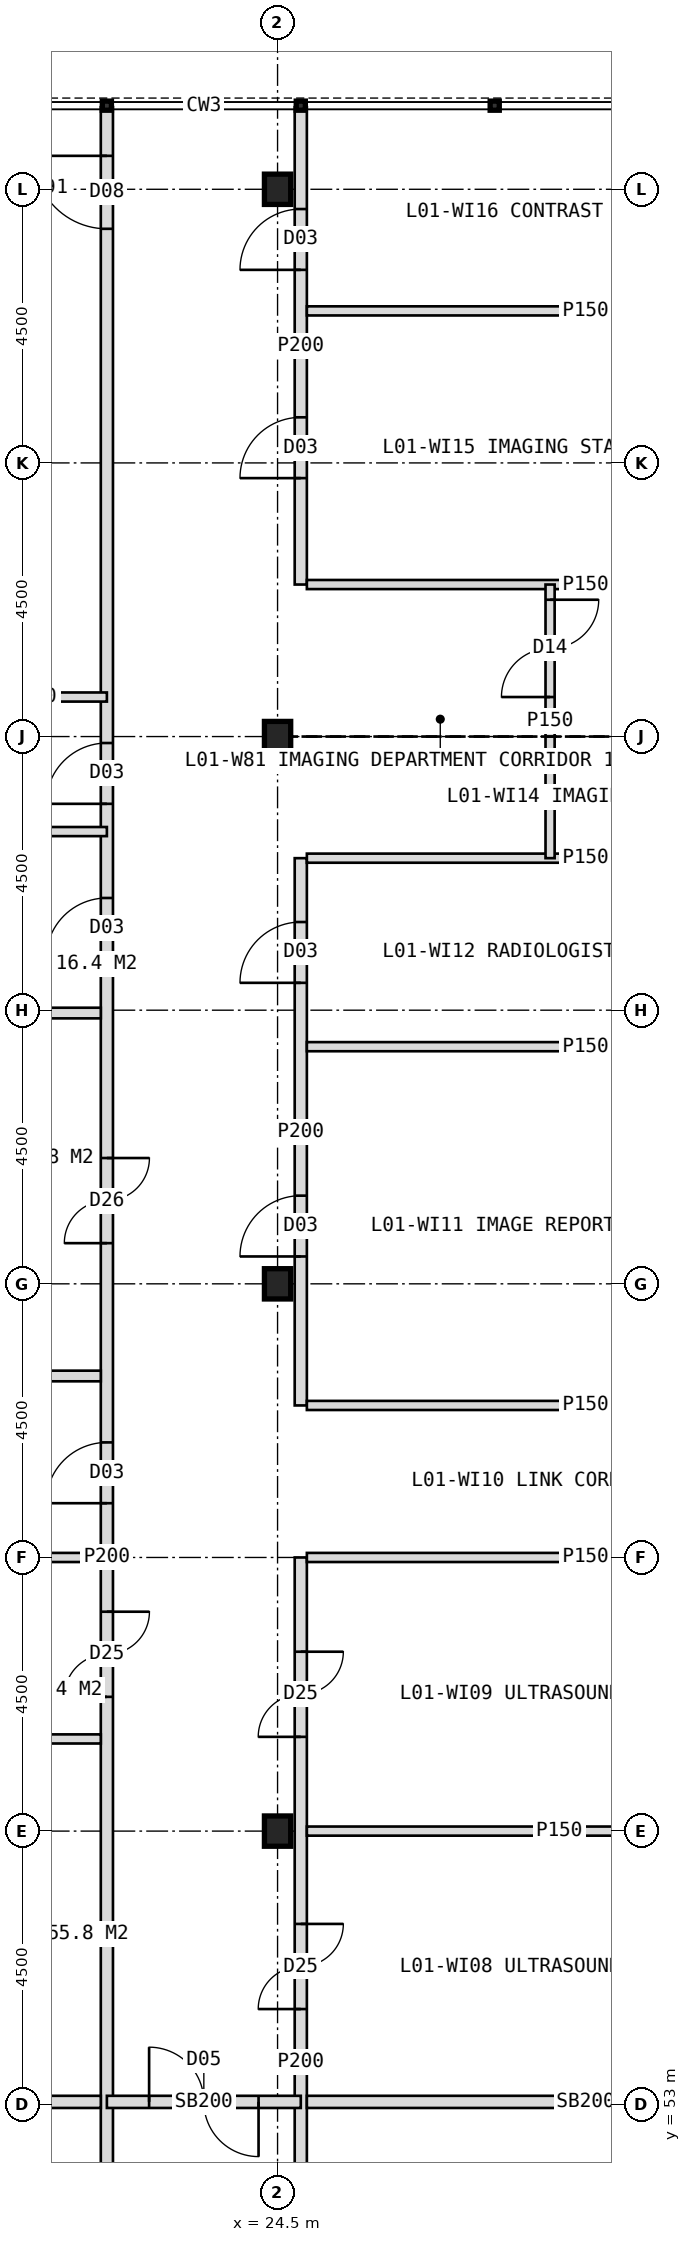
"""IFC4 building model, lengths in metres.
Left out: names, types, materials, properties, quantities, classifications, styles, units other than length and angle.
Written with IfcOpenShell. Run it as: python <this file> out.ifc"""

import sys

from ifc_helpers import new_model, si_unit, direction, frame, frame_2d, origin, origin_2d, place, context, subcontext, project, spatial, rectangle, i_section, extrude, element, fill, save


model = new_model("IFC4")
c1 = context("Model", 3, precision=1e-05, world=origin(), true_north=direction((0.0, 1.0)))
c2 = subcontext(c1, "Body", "Model", "MODEL_VIEW")
j1 = project(units=[si_unit("LENGTHUNIT", "METRE"), si_unit("PLANEANGLEUNIT", "RADIAN")], contexts=[c1])
p1 = place(None, origin())
s1 = spatial("IfcSite", under=j1, at=p1, CompositionType="ELEMENT")
p2 = place(p1, origin())
s2 = spatial("IfcBuilding", under=s1, at=p2, CompositionType="ELEMENT")
p3 = place(p2, frame((0.0, 0.0, 6.0)))
s3 = spatial("IfcBuildingStorey", under=s2, at=p3, CompositionType="ELEMENT", Elevation=6.0)
for number, where, z_axis, x_axis in (
    (1, (24.5, 57.5, 0.0), (0.0, 0.0, 1.0), (1.0, 0.0, 0.0)),
    (2, (24.5, 66.5, 0.0), (0.0, 0.0, 1.0), (1.0, 0.0, 0.0)),
    (3, (24.5, 75.5, 0.0), (0.0, 0.0, 1.0), (1.0, 0.0, 0.0)),
    (4, (24.5, 84.5, 0.0), (0.0, 0.0, 1.0), (1.0, 0.0, 0.0)),
):
    element("IfcColumn", number, at=place(p3, frame(where, z_axis=z_axis, x_axis=x_axis)), inside=s3, PredefinedType="COLUMN", context=c2, shape_type="SweptSolid", body=[
        extrude(i_section(OverallWidth=0.432, OverallDepth=0.498, WebThickness=0.056, FlangeThickness=0.089, FilletRadius=0.015, at=origin_2d()), origin(), (0.0, 0.0, 1.0), 5.0),
    ])
p4 = place(p3, frame((21.693, 38.15, 0.0), z_axis=(0.0, 0.0, 1.0), x_axis=(0.0, 1.0, 0.0)))
e5 = element("IfcWall", 5, at=p4, inside=s3, PredefinedType="PARTITIONING", context=c2, shape_type="SweptSolid", body=[
    extrude(rectangle(XDim=47.7, YDim=0.2, at=frame_2d((23.85, 0.0))), origin(), (0.0, 0.0, 1.0), 4.7),
])
p5 = place(p4, frame((45.7, 0.0, 0.0)))
e6 = element("IfcOpeningElement", 6, at=p5, cuts=e5, PredefinedType="OPENING", context=c2, shape_type="SweptSolid", body=[
    extrude(rectangle(XDim=1.2, YDim=2.1, at=frame_2d((0.6, 1.05))), frame((0.0, 0.11, 0.0), z_axis=(0.0, -1.0, 0.0), x_axis=(1.0, 0.0, 0.0)), (0.0, 0.0, 1.0), 0.22),
])
p6 = place(p4, frame((36.244, 0.0, 0.0)))
e7 = element("IfcOpeningElement", 7, at=p6, cuts=e5, PredefinedType="OPENING", context=c2, shape_type="SweptSolid", body=[
    extrude(rectangle(XDim=1.0, YDim=2.1, at=frame_2d((0.5, 1.05))), frame((0.0, 0.11, 0.0), z_axis=(0.0, -1.0, 0.0), x_axis=(1.0, 0.0, 0.0)), (0.0, 0.0, 1.0), 0.22),
])
p7 = place(p4, frame((2.222, 0.0, 0.0)))
e8 = element("IfcOpeningElement", 8, at=p7, cuts=e5, PredefinedType="OPENING", context=c2, shape_type="SweptSolid", body=[
    extrude(rectangle(XDim=1.4, YDim=2.2, at=frame_2d((0.7, 1.1))), frame((0.0, 0.11, 0.0), z_axis=(0.0, -1.0, 0.0), x_axis=(1.0, 0.0, 0.0)), (0.0, 0.0, 1.0), 0.22),
])
p8 = place(p4, frame((6.836, 0.0, 0.0)))
e9 = element("IfcOpeningElement", 9, at=p8, cuts=e5, PredefinedType="OPENING", context=c2, shape_type="SweptSolid", body=[
    extrude(rectangle(XDim=1.0, YDim=2.1, at=frame_2d((0.5, 1.05))), frame((0.0, 0.11, 0.0), z_axis=(0.0, -1.0, 0.0), x_axis=(1.0, 0.0, 0.0)), (0.0, 0.0, 1.0), 0.22),
])
p9 = place(p4, frame((11.113, 0.0, 0.0)))
e10 = element("IfcOpeningElement", 10, at=p9, cuts=e5, PredefinedType="OPENING", context=c2, shape_type="SweptSolid", body=[
    extrude(rectangle(XDim=1.4, YDim=2.2, at=frame_2d((0.7, 1.1))), frame((0.0, 0.11, 0.0), z_axis=(0.0, -1.0, 0.0), x_axis=(1.0, 0.0, 0.0)), (0.0, 0.0, 1.0), 0.22),
])
p10 = place(p4, frame((21.558, 0.0, 0.0)))
e11 = element("IfcOpeningElement", 11, at=p10, cuts=e5, PredefinedType="OPENING", context=c2, shape_type="SweptSolid", body=[
    extrude(rectangle(XDim=1.4, YDim=2.2, at=frame_2d((0.7, 1.1))), frame((0.0, 0.11, 0.0), z_axis=(0.0, -1.0, 0.0), x_axis=(1.0, 0.0, 0.0)), (0.0, 0.0, 1.0), 0.22),
])
p11 = place(p4, frame((24.742, 0.0, 0.0)))
e12 = element("IfcOpeningElement", 12, at=p11, cuts=e5, PredefinedType="OPENING", context=c2, shape_type="SweptSolid", body=[
    extrude(rectangle(XDim=1.0, YDim=2.1, at=frame_2d((0.5, 1.05))), frame((0.0, 0.11, 0.0), z_axis=(0.0, -1.0, 0.0), x_axis=(1.0, 0.0, 0.0)), (0.0, 0.0, 1.0), 0.22),
])
p12 = place(p4, frame((29.019, 0.0, 0.0)))
e13 = element("IfcOpeningElement", 13, at=p12, cuts=e5, PredefinedType="OPENING", context=c2, shape_type="SweptSolid", body=[
    extrude(rectangle(XDim=1.4, YDim=2.2, at=frame_2d((0.7, 1.1))), frame((0.0, 0.11, 0.0), z_axis=(0.0, -1.0, 0.0), x_axis=(1.0, 0.0, 0.0)), (0.0, 0.0, 1.0), 0.22),
])
p13 = place(p4, frame((33.695, 0.0, 0.0)))
e14 = element("IfcOpeningElement", 14, at=p13, cuts=e5, PredefinedType="OPENING", context=c2, shape_type="SweptSolid", body=[
    extrude(rectangle(XDim=1.0, YDim=2.1, at=frame_2d((0.5, 1.05))), frame((0.0, 0.11, 0.0), z_axis=(0.0, -1.0, 0.0), x_axis=(1.0, 0.0, 0.0)), (0.0, 0.0, 1.0), 0.22),
])
p14 = place(p3, frame((24.882, 45.4, 0.0), z_axis=(0.0, 0.0, 1.0), x_axis=(0.0, 1.0, 0.0)))
e15 = element("IfcWall", 15, at=p14, inside=s3, PredefinedType="PARTITIONING", context=c2, shape_type="SweptSolid", body=[
    extrude(rectangle(XDim=16.6, YDim=0.2, at=frame_2d((8.3, 0.0))), origin(), (0.0, 0.0, 1.0), 4.7),
])
p15 = place(p14, frame((1.65, 0.0, 0.0)))
e16 = element("IfcOpeningElement", 16, at=p15, cuts=e15, PredefinedType="OPENING", context=c2, shape_type="SweptSolid", body=[
    extrude(rectangle(XDim=1.0, YDim=2.1, at=frame_2d((0.5, 1.05))), frame((0.0, 0.11, 0.0), z_axis=(0.0, -1.0, 0.0), x_axis=(1.0, 0.0, 0.0)), (0.0, 0.0, 1.0), 0.22),
])
p16 = place(p14, frame((5.473, 0.0, 0.0)))
e17 = element("IfcOpeningElement", 17, at=p16, cuts=e15, PredefinedType="OPENING", context=c2, shape_type="SweptSolid", body=[
    extrude(rectangle(XDim=1.0, YDim=2.1, at=frame_2d((0.5, 1.05))), frame((0.0, 0.11, 0.0), z_axis=(0.0, -1.0, 0.0), x_axis=(1.0, 0.0, 0.0)), (0.0, 0.0, 1.0), 0.22),
])
p17 = place(p14, frame((9.174, 0.0, 0.0)))
e18 = element("IfcOpeningElement", 18, at=p17, cuts=e15, PredefinedType="OPENING", context=c2, shape_type="SweptSolid", body=[
    extrude(rectangle(XDim=1.4, YDim=2.2, at=frame_2d((0.7, 1.1))), frame((0.0, 0.11, 0.0), z_axis=(0.0, -1.0, 0.0), x_axis=(1.0, 0.0, 0.0)), (0.0, 0.0, 1.0), 0.22),
])
p18 = place(p14, frame((13.65, 0.0, 0.0)))
e19 = element("IfcOpeningElement", 19, at=p18, cuts=e15, PredefinedType="OPENING", context=c2, shape_type="SweptSolid", body=[
    extrude(rectangle(XDim=1.4, YDim=2.2, at=frame_2d((0.7, 1.1))), frame((0.0, 0.11, 0.0), z_axis=(0.0, -1.0, 0.0), x_axis=(1.0, 0.0, 0.0)), (0.0, 0.0, 1.0), 0.22),
])
p19 = place(p3, frame((24.882, 64.5, 0.0), z_axis=(0.0, 0.0, 1.0), x_axis=(0.0, 1.0, 0.0)))
e20 = element("IfcWall", 20, at=p19, inside=s3, PredefinedType="PARTITIONING", context=c2, shape_type="SweptSolid", body=[
    extrude(rectangle(XDim=9.0, YDim=0.2, at=frame_2d((4.5, 0.0))), origin(), (0.0, 0.0, 1.0), 4.7),
])
p20 = place(p19, frame((2.45, 0.0, 0.0)))
e21 = element("IfcOpeningElement", 21, at=p20, cuts=e20, PredefinedType="OPENING", context=c2, shape_type="SweptSolid", body=[
    extrude(rectangle(XDim=1.0, YDim=2.1, at=frame_2d((0.5, 1.05))), frame((0.0, 0.11, 0.0), z_axis=(0.0, -1.0, 0.0), x_axis=(1.0, 0.0, 0.0)), (0.0, 0.0, 1.0), 0.22),
])
p21 = place(p19, frame((6.95, 0.0, 0.0)))
e22 = element("IfcOpeningElement", 22, at=p21, cuts=e20, PredefinedType="OPENING", context=c2, shape_type="SweptSolid", body=[
    extrude(rectangle(XDim=1.0, YDim=2.1, at=frame_2d((0.5, 1.05))), frame((0.0, 0.11, 0.0), z_axis=(0.0, -1.0, 0.0), x_axis=(1.0, 0.0, 0.0)), (0.0, 0.0, 1.0), 0.22),
])
p22 = place(p3, frame((24.882, 78.0, 0.0), z_axis=(0.0, 0.0, 1.0), x_axis=(0.0, 1.0, 0.0)))
e23 = element("IfcWall", 23, at=p22, inside=s3, PredefinedType="PARTITIONING", context=c2, shape_type="SweptSolid", body=[
    extrude(rectangle(XDim=7.85, YDim=0.2, at=frame_2d((3.925, 0.0))), origin(), (0.0, 0.0, 1.0), 4.7),
])
p23 = place(p22, frame((1.75, 0.0, 0.0)))
e24 = element("IfcOpeningElement", 24, at=p23, cuts=e23, PredefinedType="OPENING", context=c2, shape_type="SweptSolid", body=[
    extrude(rectangle(XDim=1.0, YDim=2.1, at=frame_2d((0.5, 1.05))), frame((0.0, 0.11, 0.0), z_axis=(0.0, -1.0, 0.0), x_axis=(1.0, 0.0, 0.0)), (0.0, 0.0, 1.0), 0.22),
])
p24 = place(p22, frame((5.175, 0.0, 0.0)))
e25 = element("IfcOpeningElement", 25, at=p24, cuts=e23, PredefinedType="OPENING", context=c2, shape_type="SweptSolid", body=[
    extrude(rectangle(XDim=1.0, YDim=2.1, at=frame_2d((0.5, 1.05))), frame((0.0, 0.11, 0.0), z_axis=(0.0, -1.0, 0.0), x_axis=(1.0, 0.0, 0.0)), (0.0, 0.0, 1.0), 0.22),
])
p25 = place(p3, frame((21.693, 53.047, 0.0), z_axis=(0.0, 0.0, 1.0), x_axis=(1.0, 0.0, 0.0)))
e26 = element("IfcWall", 26, at=p25, inside=s3, PredefinedType="SOLIDWALL", context=c2, shape_type="SweptSolid", body=[
    extrude(rectangle(XDim=3.189, YDim=0.2, at=frame_2d((1.594, 0.0))), origin(), (0.0, 0.0, 1.0), 4.7),
])
p26 = place(p25, frame((0.695, 0.0, 0.0)))
e27 = element("IfcOpeningElement", 27, at=p26, cuts=e26, PredefinedType="OPENING", context=c2, shape_type="SweptSolid", body=[
    extrude(rectangle(XDim=1.8, YDim=2.2, at=frame_2d((0.9, 1.1))), frame((0.0, 0.11, 0.0), z_axis=(0.0, -1.0, 0.0), x_axis=(1.0, 0.0, 0.0)), (0.0, 0.0, 1.0), 0.22),
])
p27 = place(p3, frame((19.3, 76.15, 0.0), z_axis=(0.0, 0.0, 1.0), x_axis=(1.0, 0.0, 0.0)))
e28 = element("IfcWall", 28, at=p27, inside=s3, PredefinedType="PARTITIONING", context=c2, shape_type="SweptSolid", body=[
    extrude(rectangle(XDim=2.393, YDim=0.15, at=frame_2d((1.197, 0.0))), origin(), (0.0, 0.0, 1.0), 4.7),
])
p28 = place(p3, frame((12.15, 73.938, 0.0), z_axis=(0.0, 0.0, 1.0), x_axis=(1.0, 0.0, 0.0)))
e29 = element("IfcWall", 29, at=p28, inside=s3, PredefinedType="PARTITIONING", context=c2, shape_type="SweptSolid", body=[
    extrude(rectangle(XDim=9.543, YDim=0.15, at=frame_2d((4.771, 0.0))), origin(), (0.0, 0.0, 1.0), 4.7),
])
p29 = place(p3, frame((12.15, 53.047, 0.0), z_axis=(0.0, 0.0, 1.0), x_axis=(1.0, 0.0, 0.0)))
e30 = element("IfcWall", 30, at=p29, inside=s3, PredefinedType="SOLIDWALL", context=c2, shape_type="SweptSolid", body=[
    extrude(rectangle(XDim=9.443, YDim=0.2, at=frame_2d((4.722, 0.0))), origin(), (0.0, 0.0, 1.0), 4.7),
])
p30 = place(p3, frame((12.15, 59.016, 0.0), z_axis=(0.0, 0.0, 1.0), x_axis=(1.0, 0.0, 0.0)))
e31 = element("IfcWall", 31, at=p30, inside=s3, PredefinedType="PARTITIONING", context=c2, shape_type="SweptSolid", body=[
    extrude(rectangle(XDim=9.443, YDim=0.15, at=frame_2d((4.722, 0.0))), origin(), (0.0, 0.0, 1.0), 4.7),
])
p31 = place(p30, frame((5.993, 0.0, 0.0)))
e32 = element("IfcOpeningElement", 32, at=p31, cuts=e31, PredefinedType="OPENING", context=c2, shape_type="SweptSolid", body=[
    extrude(rectangle(XDim=1.4, YDim=2.2, at=frame_2d((0.7, 1.1))), frame((0.0, 0.085, 0.0), z_axis=(0.0, -1.0, 0.0), x_axis=(1.0, 0.0, 0.0)), (0.0, 0.0, 1.0), 0.17),
])
p32 = place(p30, frame((1.521, 0.0, 0.0)))
e33 = element("IfcOpeningElement", 33, at=p32, cuts=e31, PredefinedType="OPENING", context=c2, shape_type="SweptSolid", body=[
    extrude(rectangle(XDim=1.0, YDim=2.1, at=frame_2d((0.5, 1.05))), frame((0.0, 0.085, 0.0), z_axis=(0.0, -1.0, 0.0), x_axis=(1.0, 0.0, 0.0)), (0.0, 0.0, 1.0), 0.17),
])
p33 = place(p3, frame((12.15, 62.0, 0.0), z_axis=(0.0, 0.0, 1.0), x_axis=(1.0, 0.0, 0.0)))
e34 = element("IfcWall", 34, at=p33, inside=s3, PredefinedType="PARTITIONING", context=c2, shape_type="SweptSolid", body=[
    extrude(rectangle(XDim=9.443, YDim=0.15, at=frame_2d((4.722, 0.0))), origin(), (0.0, 0.0, 1.0), 4.7),
])
p34 = place(p3, frame((12.15, 64.984, 0.0), z_axis=(0.0, 0.0, 1.0), x_axis=(1.0, 0.0, 0.0)))
e35 = element("IfcWall", 35, at=p34, inside=s3, PredefinedType="PARTITIONING", context=c2, shape_type="SweptSolid", body=[
    extrude(rectangle(XDim=9.443, YDim=0.175, at=frame_2d((4.722, 0.0))), origin(), (0.0, 0.0, 1.0), 4.7),
])
p35 = place(p3, frame((12.15, 70.953, 0.0), z_axis=(0.0, 0.0, 1.0), x_axis=(1.0, 0.0, 0.0)))
e36 = element("IfcWall", 36, at=p35, inside=s3, PredefinedType="PARTITIONING", context=c2, shape_type="SweptSolid", body=[
    extrude(rectangle(XDim=9.443, YDim=0.175, at=frame_2d((4.722, 0.0))), origin(), (0.0, 0.0, 1.0), 4.7),
])
p36 = place(p35, frame((5.993, 0.0, 0.0)))
e37 = element("IfcOpeningElement", 37, at=p36, cuts=e36, PredefinedType="OPENING", context=c2, shape_type="SweptSolid", body=[
    extrude(rectangle(XDim=1.4, YDim=2.1, at=frame_2d((0.7, 1.05))), frame((0.0, 0.097, 0.0), z_axis=(0.0, -1.0, 0.0), x_axis=(1.0, 0.0, 0.0)), (0.0, 0.0, 1.0), 0.195),
])
p37 = place(p3, frame((24.982, 53.047, 0.0), z_axis=(0.0, 0.0, 1.0), x_axis=(1.0, 0.0, 0.0)))
e38 = element("IfcWall", 38, at=p37, inside=s3, PredefinedType="SOLIDWALL", context=c2, shape_type="SweptSolid", body=[
    extrude(rectangle(XDim=9.168, YDim=0.2, at=frame_2d((4.584, 0.0))), origin(), (0.0, 0.0, 1.0), 4.7),
])
p38 = place(p3, frame((24.982, 57.5, 0.0), z_axis=(0.0, 0.0, 1.0), x_axis=(1.0, 0.0, 0.0)))
e39 = element("IfcWall", 39, at=p38, inside=s3, PredefinedType="PARTITIONING", context=c2, shape_type="SweptSolid", body=[
    extrude(rectangle(XDim=8.302, YDim=0.15, at=frame_2d((4.151, 0.0))), origin(), (0.0, 0.0, 1.0), 3.9),
])
for number, where, z_axis, x_axis in (
    (40, (24.982, 62.0, 0.0), (0.0, 0.0, 1.0), (1.0, 0.0, 0.0)),
    (41, (24.982, 64.5, 0.0), (0.0, 0.0, 1.0), (1.0, 0.0, 0.0)),
    (42, (24.982, 70.4, 0.0), (0.0, 0.0, 1.0), (1.0, 0.0, 0.0)),
    (43, (24.982, 73.5, 0.0), (0.0, 0.0, 1.0), (1.0, 0.0, 0.0)),
    (44, (24.982, 78.0, 0.0), (0.0, 0.0, 1.0), (1.0, 0.0, 0.0)),
    (45, (24.982, 82.5, 0.0), (0.0, 0.0, 1.0), (1.0, 0.0, 0.0)),
):
    element("IfcWall", number, at=place(p3, frame(where, z_axis=z_axis, x_axis=x_axis)), inside=s3, PredefinedType="PARTITIONING", context=c2, shape_type="SweptSolid", body=[
        extrude(rectangle(XDim=9.168, YDim=0.15, at=frame_2d((4.584, 0.0))), origin(), (0.0, 0.0, 1.0), 4.7),
    ])
p39 = place(p3, frame((28.982, 73.5, 0.0), z_axis=(0.0, 0.0, 1.0), x_axis=(0.0, 1.0, 0.0)))
e46 = element("IfcWall", 46, at=p39, inside=s3, PredefinedType="PARTITIONING", context=c2, shape_type="SweptSolid", body=[
    extrude(rectangle(XDim=4.5, YDim=0.15, at=frame_2d((2.25, 0.0))), origin(), (0.0, 0.0, 1.0), 4.7),
])
p40 = place(p39, frame((2.65, 0.0, 0.0)))
e47 = element("IfcOpeningElement", 47, at=p40, cuts=e46, PredefinedType="OPENING", context=c2, shape_type="SweptSolid", body=[
    extrude(rectangle(XDim=1.6, YDim=2.2, at=frame_2d((0.8, 1.1))), frame((0.0, 0.085, 0.0), z_axis=(0.0, -1.0, 0.0), x_axis=(1.0, 0.0, 0.0)), (0.0, 0.0, 1.0), 0.17),
])
p41 = place(p26, origin())
e48 = element("IfcDoor", 48, at=p41, inside=s3, OperationType="DOUBLE_DOOR_DOUBLE_SWING", PredefinedType="DOOR", context=c2, shape_type="SweptSolid", body=[
    extrude(rectangle(XDim=1.8, YDim=2.2, at=frame_2d((0.9, 1.1))), frame((0.0, 0.025, 0.0), z_axis=(0.0, -1.0, 0.0), x_axis=(1.0, 0.0, 0.0)), (0.0, 0.0, 1.0), 0.05),
])
fill(e27, e48)
p42 = place(p5, origin())
e49 = element("IfcDoor", 49, at=p42, inside=s3, OperationType="SINGLE_SWING_RIGHT", PredefinedType="DOOR", context=c2, shape_type="SweptSolid", body=[
    extrude(rectangle(XDim=1.2, YDim=2.1, at=frame_2d((0.6, 1.05))), frame((0.0, 0.025, 0.0), z_axis=(0.0, -1.0, 0.0), x_axis=(1.0, 0.0, 0.0)), (0.0, 0.0, 1.0), 0.05),
])
fill(e6, e49)
p43 = place(p6, origin())
e50 = element("IfcDoor", 50, at=p43, inside=s3, OperationType="SINGLE_SWING_LEFT", PredefinedType="DOOR", context=c2, shape_type="SweptSolid", body=[
    extrude(rectangle(XDim=1.0, YDim=2.1, at=frame_2d((0.5, 1.05))), frame((0.0, 0.025, 0.0), z_axis=(0.0, -1.0, 0.0), x_axis=(1.0, 0.0, 0.0)), (0.0, 0.0, 1.0), 0.05),
])
fill(e7, e50)
p44 = place(p10, origin())
e51 = element("IfcDoor", 51, at=p44, inside=s3, OperationType="DOUBLE_DOOR_SINGLE_SWING", PredefinedType="DOOR", context=c2, shape_type="SweptSolid", body=[
    extrude(rectangle(XDim=1.4, YDim=2.2, at=frame_2d((0.7, 1.1))), frame((0.0, 0.025, 0.0), z_axis=(0.0, -1.0, 0.0), x_axis=(1.0, 0.0, 0.0)), (0.0, 0.0, 1.0), 0.05),
])
fill(e11, e51)
p45 = place(p11, origin())
e52 = element("IfcDoor", 52, at=p45, inside=s3, OperationType="SINGLE_SWING_LEFT", PredefinedType="DOOR", context=c2, shape_type="SweptSolid", body=[
    extrude(rectangle(XDim=1.0, YDim=2.1, at=frame_2d((0.5, 1.05))), frame((0.0, 0.025, 0.0), z_axis=(0.0, -1.0, 0.0), x_axis=(1.0, 0.0, 0.0)), (0.0, 0.0, 1.0), 0.05),
])
fill(e12, e52)
p46 = place(p12, origin())
e53 = element("IfcDoor", 53, at=p46, inside=s3, OperationType="DOUBLE_DOOR_SINGLE_SWING", PredefinedType="DOOR", context=c2, shape_type="SweptSolid", body=[
    extrude(rectangle(XDim=1.4, YDim=2.2, at=frame_2d((0.7, 1.1))), frame((0.0, 0.025, 0.0), z_axis=(0.0, -1.0, 0.0), x_axis=(1.0, 0.0, 0.0)), (0.0, 0.0, 1.0), 0.05),
])
fill(e13, e53)
p47 = place(p13, origin())
e54 = element("IfcDoor", 54, at=p47, inside=s3, OperationType="SINGLE_SWING_LEFT", PredefinedType="DOOR", context=c2, shape_type="SweptSolid", body=[
    extrude(rectangle(XDim=1.0, YDim=2.1, at=frame_2d((0.5, 1.05))), frame((0.0, 0.025, 0.0), z_axis=(0.0, -1.0, 0.0), x_axis=(1.0, 0.0, 0.0)), (0.0, 0.0, 1.0), 0.05),
])
fill(e14, e54)
p48 = place(p17, origin())
e55 = element("IfcDoor", 55, at=p48, inside=s3, OperationType="DOUBLE_DOOR_SINGLE_SWING", PredefinedType="DOOR", context=c2, shape_type="SweptSolid", body=[
    extrude(rectangle(XDim=1.4, YDim=2.2, at=frame_2d((0.7, 1.1))), frame((0.0, 0.025, 0.0), z_axis=(0.0, -1.0, 0.0), x_axis=(1.0, 0.0, 0.0)), (0.0, 0.0, 1.0), 0.05),
])
fill(e18, e55)
p49 = place(p18, origin())
e56 = element("IfcDoor", 56, at=p49, inside=s3, OperationType="DOUBLE_DOOR_SINGLE_SWING", PredefinedType="DOOR", context=c2, shape_type="SweptSolid", body=[
    extrude(rectangle(XDim=1.4, YDim=2.2, at=frame_2d((0.7, 1.1))), frame((0.0, 0.025, 0.0), z_axis=(0.0, -1.0, 0.0), x_axis=(1.0, 0.0, 0.0)), (0.0, 0.0, 1.0), 0.05),
])
fill(e19, e56)
p50 = place(p20, origin())
e57 = element("IfcDoor", 57, at=p50, inside=s3, OperationType="SINGLE_SWING_LEFT", PredefinedType="DOOR", context=c2, shape_type="SweptSolid", body=[
    extrude(rectangle(XDim=1.0, YDim=2.1, at=frame_2d((0.5, 1.05))), frame((0.0, 0.025, 0.0), z_axis=(0.0, -1.0, 0.0), x_axis=(1.0, 0.0, 0.0)), (0.0, 0.0, 1.0), 0.05),
])
fill(e21, e57)
p51 = place(p21, origin())
e58 = element("IfcDoor", 58, at=p51, inside=s3, OperationType="SINGLE_SWING_LEFT", PredefinedType="DOOR", context=c2, shape_type="SweptSolid", body=[
    extrude(rectangle(XDim=1.0, YDim=2.1, at=frame_2d((0.5, 1.05))), frame((0.0, 0.025, 0.0), z_axis=(0.0, -1.0, 0.0), x_axis=(1.0, 0.0, 0.0)), (0.0, 0.0, 1.0), 0.05),
])
fill(e22, e58)
p52 = place(p40, origin())
e59 = element("IfcDoor", 59, at=p52, inside=s3, OperationType="DOUBLE_DOOR_DOUBLE_SWING", PredefinedType="DOOR", context=c2, shape_type="SweptSolid", body=[
    extrude(rectangle(XDim=1.6, YDim=2.2, at=frame_2d((0.8, 1.1))), frame((0.0, 0.025, 0.0), z_axis=(0.0, -1.0, 0.0), x_axis=(1.0, 0.0, 0.0)), (0.0, 0.0, 1.0), 0.05),
])
fill(e47, e59)
p53 = place(p23, origin())
e60 = element("IfcDoor", 60, at=p53, inside=s3, OperationType="SINGLE_SWING_LEFT", PredefinedType="DOOR", context=c2, shape_type="SweptSolid", body=[
    extrude(rectangle(XDim=1.0, YDim=2.1, at=frame_2d((0.5, 1.05))), frame((0.0, 0.025, 0.0), z_axis=(0.0, -1.0, 0.0), x_axis=(1.0, 0.0, 0.0)), (0.0, 0.0, 1.0), 0.05),
])
fill(e24, e60)
p54 = place(p24, origin())
e61 = element("IfcDoor", 61, at=p54, inside=s3, OperationType="SINGLE_SWING_LEFT", PredefinedType="DOOR", context=c2, shape_type="SweptSolid", body=[
    extrude(rectangle(XDim=1.0, YDim=2.1, at=frame_2d((0.5, 1.05))), frame((0.0, 0.025, 0.0), z_axis=(0.0, -1.0, 0.0), x_axis=(1.0, 0.0, 0.0)), (0.0, 0.0, 1.0), 0.05),
])
fill(e25, e61)
save(model, sys.argv[1])
